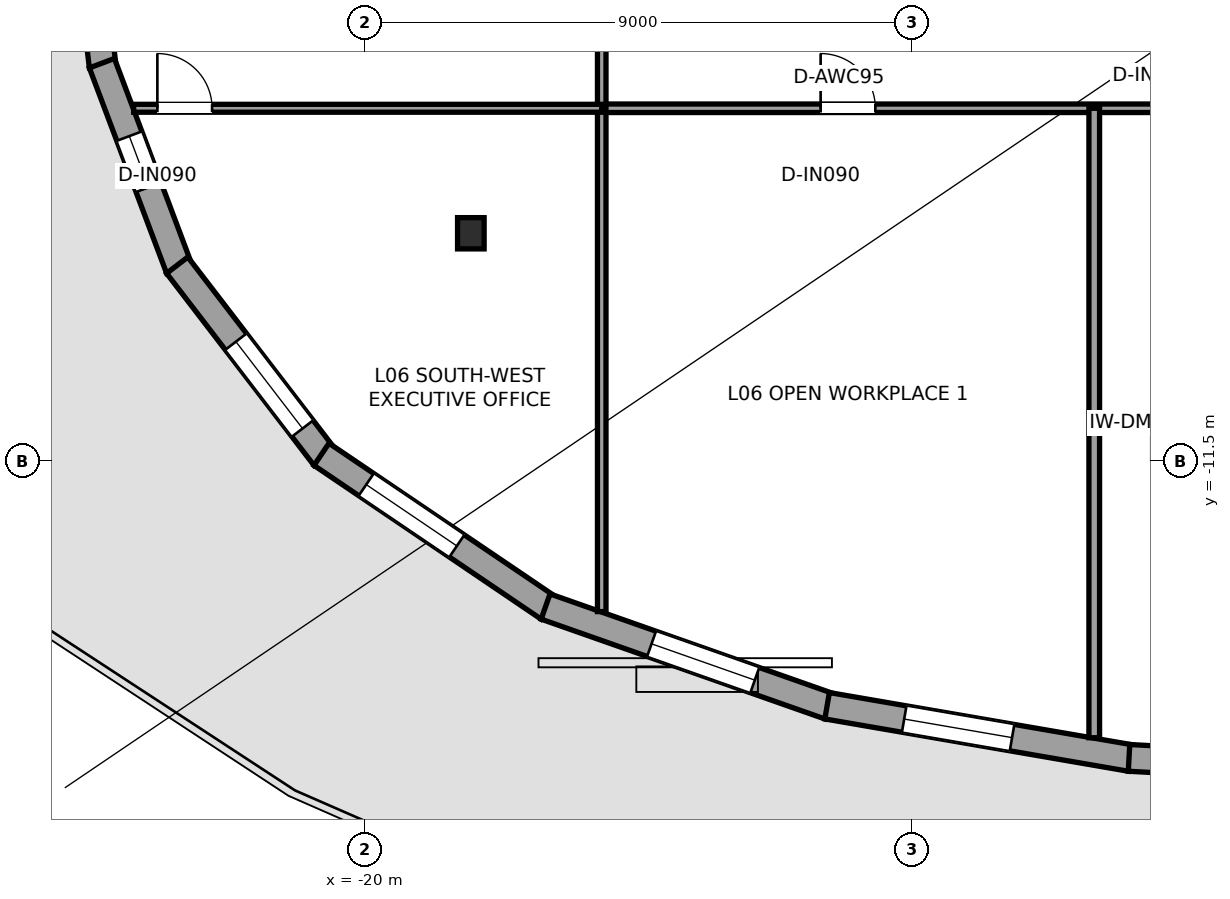
"""IFC4 building model, lengths in metres.
Left out: names, types, materials, properties, quantities, classifications, styles, units other than length and angle.
Written with IfcOpenShell. Run it as: python <this file> out.ifc"""

import sys

from ifc_helpers import new_model, si_unit, direction, frame, frame_2d, origin, origin_2d, place, context, subcontext, project, spatial, rectangle, i_section, extrude, element, fill, save


model = new_model("IFC4")
c1 = context("Model", 3, precision=1e-05, world=origin(), true_north=direction((0.0, 1.0)))
c2 = subcontext(c1, "Body", "Model", "MODEL_VIEW")
j1 = project(units=[si_unit("LENGTHUNIT", "METRE"), si_unit("PLANEANGLEUNIT", "RADIAN")], contexts=[c1])
p1 = place(None, origin())
s1 = spatial("IfcSite", under=j1, at=p1, CompositionType="ELEMENT")
p2 = place(p1, origin())
s2 = spatial("IfcBuilding", under=s1, at=p2, CompositionType="ELEMENT")
p3 = place(p2, frame((0.0, 0.0, 27.0)))
s3 = spatial("IfcBuildingStorey", under=s2, at=p3, CompositionType="ELEMENT", Elevation=27.0)
p4 = place(p3, frame((-18.253, -7.756, 0.0), z_axis=(0.0, 0.0, 1.0), x_axis=(1.0, 0.0, 0.0)))
e1 = element("IfcColumn", 1, at=p4, inside=s3, PredefinedType="COLUMN", context=c2, shape_type="SweptSolid", body=[
    extrude(i_section(OverallWidth=0.437, OverallDepth=0.514, WebThickness=0.061, FlangeThickness=0.097, at=origin_2d()), origin(), (0.0, 0.0, 1.0), 3.6),
])
p5 = place(p3, frame((-24.308, -5.01, 0.0), z_axis=(0.0, 0.0, 1.0), x_axis=(-0.118754274869, 0.992923673905, 0.0)))
e2 = element("IfcWall", 2, at=p5, inside=s3, PredefinedType="STANDARD", context=c2, shape_type="SweptSolid", body=[
    extrude(rectangle(XDim=3.398, YDim=0.44, at=frame_2d((1.699, 0.0))), origin(), (0.0, 0.0, 1.0), 2.533),
])
p6 = place(p5, frame((0.4, 0.0, 0.65)))
e3 = element("IfcOpeningElement", 3, at=p6, cuts=e2, PredefinedType="OPENING", context=c2, shape_type="SweptSolid", body=[
    extrude(rectangle(XDim=1.5, YDim=1.7, at=frame_2d((0.75, 0.85))), frame((0.0, 0.23, 0.0), z_axis=(0.0, -1.0, 0.0), x_axis=(1.0, 0.0, 0.0)), (0.0, 0.0, 1.0), 0.46),
])
p7 = place(p3, frame((-23.05, -8.337, 0.0), z_axis=(0.0, 0.0, 1.0), x_axis=(-0.351960996761, 0.936014666957, 0.0)))
e4 = element("IfcWall", 4, at=p7, inside=s3, PredefinedType="STANDARD", context=c2, shape_type="SweptSolid", body=[
    extrude(rectangle(XDim=3.609, YDim=0.44, at=frame_2d((1.805, 0.0))), origin(), (0.0, 0.0, 1.0), 2.533),
])
p8 = place(p7, frame((1.428, 0.0, 0.58)))
e5 = element("IfcOpeningElement", 5, at=p8, cuts=e4, PredefinedType="OPENING", context=c2, shape_type="SweptSolid", body=[
    extrude(rectangle(XDim=0.9, YDim=1.35, at=frame_2d((0.45, 0.675))), frame((0.0, 0.23, 0.0), z_axis=(0.0, -1.0, 0.0), x_axis=(1.0, 0.0, 0.0)), (0.0, 0.0, 1.0), 0.46),
])
p9 = place(p3, frame((-20.658, -11.439, 0.0), z_axis=(0.0, 0.0, 1.0), x_axis=(-0.608803527611, 0.793321035123, 0.0)))
e6 = element("IfcWall", 6, at=p9, inside=s3, PredefinedType="STANDARD", context=c2, shape_type="SweptSolid", body=[
    extrude(rectangle(XDim=3.981, YDim=0.44, at=frame_2d((1.991, 0.0))), origin(), (0.0, 0.0, 1.0), 2.533),
])
p10 = place(p9, frame((0.596, 0.0, 0.65)))
e7 = element("IfcOpeningElement", 7, at=p10, cuts=e6, PredefinedType="OPENING", context=c2, shape_type="SweptSolid", body=[
    extrude(rectangle(XDim=1.8, YDim=1.7, at=frame_2d((0.9, 0.85))), frame((0.0, 0.23, 0.0), z_axis=(0.0, -1.0, 0.0), x_axis=(1.0, 0.0, 0.0)), (0.0, 0.0, 1.0), 0.46),
])
p11 = place(p3, frame((-16.973, -13.919, 0.0), z_axis=(0.0, 0.0, 1.0), x_axis=(-0.828124546302, 0.560544142608, 0.0)))
e8 = element("IfcWall", 8, at=p11, inside=s3, PredefinedType="STANDARD", context=c2, shape_type="SweptSolid", body=[
    extrude(rectangle(XDim=4.511, YDim=0.44, at=frame_2d((2.255, 0.0))), origin(), (0.0, 0.0, 1.0), 2.533),
])
p12 = place(p11, frame((1.823, 0.0, 0.65)))
e9 = element("IfcOpeningElement", 9, at=p12, cuts=e8, PredefinedType="OPENING", context=c2, shape_type="SweptSolid", body=[
    extrude(rectangle(XDim=1.8, YDim=1.7, at=frame_2d((0.9, 0.85))), frame((0.0, 0.23, 0.0), z_axis=(0.0, -1.0, 0.0), x_axis=(1.0, 0.0, 0.0)), (0.0, 0.0, 1.0), 0.46),
])
p13 = place(p3, frame((-12.358, -15.535, 0.0), z_axis=(0.0, 0.0, 1.0), x_axis=(-0.94336246541, 0.331763860082, 0.0)))
e10 = element("IfcWall", 10, at=p13, inside=s3, PredefinedType="STANDARD", context=c2, shape_type="SweptSolid", body=[
    extrude(rectangle(XDim=4.946, YDim=0.44, at=frame_2d((2.473, 0.0))), origin(), (0.0, 0.0, 1.0), 2.529),
])
p14 = place(p13, frame((1.298, 0.0, 0.65)))
e11 = element("IfcOpeningElement", 11, at=p14, cuts=e10, PredefinedType="OPENING", context=c2, shape_type="SweptSolid", body=[
    extrude(rectangle(XDim=1.8, YDim=1.7, at=frame_2d((0.9, 0.85))), frame((0.0, 0.23, 0.0), z_axis=(0.0, -1.0, 0.0), x_axis=(1.0, 0.0, 0.0)), (0.0, 0.0, 1.0), 0.46),
])
p15 = place(p3, frame((-7.403, -16.386, 0.0), z_axis=(0.0, 0.0, 1.0), x_axis=(-0.985480149415, 0.169790680278, 0.0)))
e12 = element("IfcWall", 12, at=p15, inside=s3, PredefinedType="STANDARD", context=c2, shape_type="SweptSolid", body=[
    extrude(rectangle(XDim=5.064, YDim=0.44, at=frame_2d((2.532, 0.0))), origin(), (0.0, 0.0, 1.0), 2.533),
])
p16 = place(p15, frame((1.978, 0.0, 0.65)))
e13 = element("IfcOpeningElement", 13, at=p16, cuts=e12, PredefinedType="OPENING", context=c2, shape_type="SweptSolid", body=[
    extrude(rectangle(XDim=1.8, YDim=1.7, at=frame_2d((0.9, 0.85))), frame((0.0, 0.23, 0.0), z_axis=(0.0, -1.0, 0.0), x_axis=(1.0, 0.0, 0.0)), (0.0, 0.0, 1.0), 0.46),
])
p17 = place(p3, frame((-2.443, -16.656, 0.0), z_axis=(0.0, 0.0, 1.0), x_axis=(-0.998501456853, 0.054725137396, 0.0)))
e14 = element("IfcWall", 14, at=p17, inside=s3, PredefinedType="STANDARD", context=c2, shape_type="SweptSolid", body=[
    extrude(rectangle(XDim=4.992, YDim=0.44, at=frame_2d((2.496, 0.0))), origin(), (0.0, 0.0, 1.0), 2.533),
])
p18 = place(p17, frame((0.949, 0.0, 0.0)))
e15 = element("IfcOpeningElement", 15, at=p18, cuts=e14, PredefinedType="OPENING", context=c2, shape_type="SweptSolid", body=[
    extrude(rectangle(XDim=1.1, YDim=2.15, at=frame_2d((0.55, 1.075))), frame((0.0, 0.23, 0.0), z_axis=(0.0, -1.0, 0.0), x_axis=(1.0, 0.0, 0.0)), (0.0, 0.0, 1.0), 0.46),
])
p19 = place(p3, frame((-16.1, -5.7, 0.0), z_axis=(0.0, 0.0, 1.0), x_axis=(1.0, 0.0, 0.0)))
e16 = element("IfcWall", 16, at=p19, inside=s3, PredefinedType="PARTITIONING", context=c2, shape_type="SweptSolid", body=[
    extrude(rectangle(XDim=32.2, YDim=0.14, at=frame_2d((16.1, 0.0))), origin(), (0.0, 0.0, 1.0), 2.853),
])
p20 = place(p19, frame((3.6, 0.0, 0.0)))
e17 = element("IfcOpeningElement", 17, at=p20, cuts=e16, PredefinedType="OPENING", context=c2, shape_type="SweptSolid", body=[
    extrude(rectangle(XDim=0.9, YDim=2.1, at=frame_2d((0.45, 1.05))), frame((0.0, 0.08, 0.0), z_axis=(0.0, -1.0, 0.0), x_axis=(1.0, 0.0, 0.0)), (0.0, 0.0, 1.0), 0.16),
])
p21 = place(p19, frame((11.35, 0.0, 0.0)))
e18 = element("IfcOpeningElement", 18, at=p21, cuts=e16, PredefinedType="OPENING", context=c2, shape_type="SweptSolid", body=[
    extrude(rectangle(XDim=1.5, YDim=2.15, at=frame_2d((0.75, 1.075))), frame((0.0, 0.08, 0.0), z_axis=(0.0, -1.0, 0.0), x_axis=(1.0, 0.0, 0.0)), (0.0, 0.0, 1.0), 0.16),
])
p22 = place(p19, frame((19.65, 0.0, 0.0)))
e19 = element("IfcOpeningElement", 19, at=p22, cuts=e16, PredefinedType="OPENING", context=c2, shape_type="SweptSolid", body=[
    extrude(rectangle(XDim=0.9, YDim=2.1, at=frame_2d((0.45, 1.05))), frame((0.0, 0.08, 0.0), z_axis=(0.0, -1.0, 0.0), x_axis=(1.0, 0.0, 0.0)), (0.0, 0.0, 1.0), 0.16),
])
p23 = place(p19, frame((27.7, 0.0, 0.0)))
e20 = element("IfcOpeningElement", 20, at=p23, cuts=e16, PredefinedType="OPENING", context=c2, shape_type="SweptSolid", body=[
    extrude(rectangle(XDim=0.9, YDim=2.1, at=frame_2d((0.45, 1.05))), frame((0.0, 0.08, 0.0), z_axis=(0.0, -1.0, 0.0), x_axis=(1.0, 0.0, 0.0)), (0.0, 0.0, 1.0), 0.16),
])
p24 = place(p3, frame((-16.1, -13.977, 0.0), z_axis=(0.0, 0.0, 1.0), x_axis=(0.0, 1.0, 0.0)))
e21 = element("IfcWall", 21, at=p24, inside=s3, PredefinedType="PARTITIONING", context=c2, shape_type="SweptSolid", body=[
    extrude(rectangle(XDim=19.827, YDim=0.14, at=frame_2d((9.914, 0.0))), origin(), (0.0, 0.0, 1.0), 2.841),
])
p25 = place(p24, frame((10.177, 0.0, 0.0)))
e22 = element("IfcOpeningElement", 22, at=p25, cuts=e21, PredefinedType="OPENING", context=c2, shape_type="SweptSolid", body=[
    extrude(rectangle(XDim=0.9, YDim=2.1, at=frame_2d((0.45, 1.05))), frame((0.0, 0.08, 0.0), z_axis=(0.0, -1.0, 0.0), x_axis=(1.0, 0.0, 0.0)), (0.0, 0.0, 1.0), 0.16),
])
p26 = place(p24, frame((15.952, 0.0, 0.0)))
e23 = element("IfcOpeningElement", 23, at=p26, cuts=e21, PredefinedType="OPENING", context=c2, shape_type="SweptSolid", body=[
    extrude(rectangle(XDim=0.9, YDim=2.1, at=frame_2d((0.45, 1.05))), frame((0.0, 0.08, 0.0), z_axis=(0.0, -1.0, 0.0), x_axis=(1.0, 0.0, 0.0)), (0.0, 0.0, 1.0), 0.16),
])
p27 = place(p3, frame((-8.0, -16.052, 0.0), z_axis=(0.0, 0.0, 1.0), x_axis=(0.0, 1.0, 0.0)))
e24 = element("IfcWall", 24, at=p27, inside=s3, PredefinedType="PARTITIONING", context=c2, shape_type="SweptSolid", body=[
    extrude(rectangle(XDim=10.352, YDim=0.175, at=frame_2d((5.176, 0.0))), origin(), (0.0, 0.0, 1.0), 2.853),
])
p28 = place(p3, frame((-23.798, -5.7, 0.0), z_axis=(0.0, 0.0, 1.0), x_axis=(1.0, 0.0, 0.0)))
e25 = element("IfcWall", 25, at=p28, inside=s3, PredefinedType="PARTITIONING", context=c2, shape_type="SweptSolid", body=[
    extrude(rectangle(XDim=7.698, YDim=0.13, at=frame_2d((3.849, 0.0))), origin(), (0.0, 0.0, 1.0), 2.779),
])
p29 = place(p28, frame((0.39, 0.0, 0.0)))
e26 = element("IfcOpeningElement", 26, at=p29, cuts=e25, PredefinedType="OPENING", context=c2, shape_type="SweptSolid", body=[
    extrude(rectangle(XDim=0.9, YDim=2.1, at=frame_2d((0.45, 1.05))), frame((0.0, 0.075, 0.0), z_axis=(0.0, -1.0, 0.0), x_axis=(1.0, 0.0, 0.0)), (0.0, 0.0, 1.0), 0.15),
])
p30 = place(p8, origin())
e27 = element("IfcWindow", 27, at=p30, inside=s3, PartitioningType="SINGLE_PANEL", PredefinedType="WINDOW", context=c2, shape_type="SweptSolid", body=[
    extrude(rectangle(XDim=0.9, YDim=1.35, at=frame_2d((0.45, 0.675))), frame((0.0, -0.01, 0.0), z_axis=(0.0, -1.0, 0.0), x_axis=(1.0, 0.0, 0.0)), (0.0, 0.0, 1.0), 0.06),
])
fill(e5, e27)
p31 = place(p10, origin())
e28 = element("IfcWindow", 28, at=p31, inside=s3, PartitioningType="SINGLE_PANEL", PredefinedType="WINDOW", context=c2, shape_type="SweptSolid", body=[
    extrude(rectangle(XDim=1.8, YDim=1.7, at=frame_2d((0.9, 0.85))), frame((0.0, -0.01, 0.0), z_axis=(0.0, -1.0, 0.0), x_axis=(1.0, 0.0, 0.0)), (0.0, 0.0, 1.0), 0.06),
])
fill(e7, e28)
p32 = place(p12, origin())
e29 = element("IfcWindow", 29, at=p32, inside=s3, PartitioningType="SINGLE_PANEL", PredefinedType="WINDOW", context=c2, shape_type="SweptSolid", body=[
    extrude(rectangle(XDim=1.8, YDim=1.7, at=frame_2d((0.9, 0.85))), frame((0.0, -0.01, 0.0), z_axis=(0.0, -1.0, 0.0), x_axis=(1.0, 0.0, 0.0)), (0.0, 0.0, 1.0), 0.06),
])
fill(e9, e29)
p33 = place(p14, origin())
e30 = element("IfcWindow", 30, at=p33, inside=s3, PartitioningType="SINGLE_PANEL", PredefinedType="WINDOW", context=c2, shape_type="SweptSolid", body=[
    extrude(rectangle(XDim=1.8, YDim=1.7, at=frame_2d((0.9, 0.85))), frame((0.0, -0.01, 0.0), z_axis=(0.0, -1.0, 0.0), x_axis=(1.0, 0.0, 0.0)), (0.0, 0.0, 1.0), 0.06),
])
fill(e11, e30)
p34 = place(p16, origin())
e31 = element("IfcWindow", 31, at=p34, inside=s3, PartitioningType="SINGLE_PANEL", PredefinedType="WINDOW", context=c2, shape_type="SweptSolid", body=[
    extrude(rectangle(XDim=1.8, YDim=1.7, at=frame_2d((0.9, 0.85))), frame((0.0, -0.01, 0.0), z_axis=(0.0, -1.0, 0.0), x_axis=(1.0, 0.0, 0.0)), (0.0, 0.0, 1.0), 0.06),
])
fill(e13, e31)
p35 = place(p20, origin())
e32 = element("IfcDoor", 32, at=p35, inside=s3, OperationType="SINGLE_SWING_LEFT", PredefinedType="DOOR", context=c2, shape_type="SweptSolid", body=[
    extrude(rectangle(XDim=0.9, YDim=2.1, at=frame_2d((0.45, 1.05))), frame((0.0, 0.025, 0.0), z_axis=(0.0, -1.0, 0.0), x_axis=(1.0, 0.0, 0.0)), (0.0, 0.0, 1.0), 0.05),
])
fill(e17, e32)
p36 = place(p29, origin())
e33 = element("IfcDoor", 33, at=p36, inside=s3, OperationType="SINGLE_SWING_LEFT", PredefinedType="DOOR", context=c2, shape_type="SweptSolid", body=[
    extrude(rectangle(XDim=0.9, YDim=2.1, at=frame_2d((0.45, 1.05))), frame((0.0, 0.025, 0.0), z_axis=(0.0, -1.0, 0.0), x_axis=(1.0, 0.0, 0.0)), (0.0, 0.0, 1.0), 0.05),
])
fill(e26, e33)
save(model, sys.argv[1])
